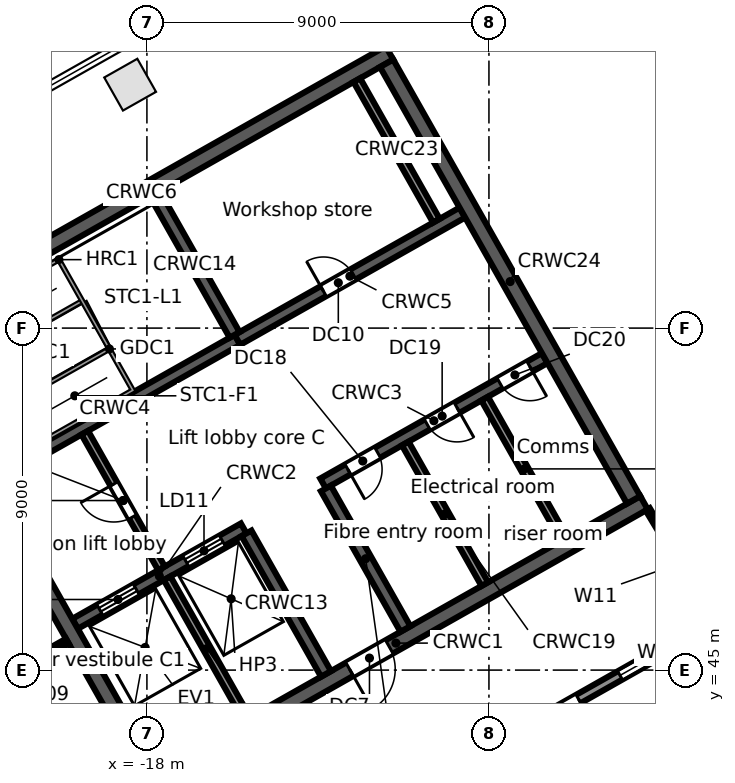
"""IFC4 building model, lengths in metres.
Left out: names, types, materials, properties, quantities, classifications, styles, units other than length and angle.
Written with IfcOpenShell. Run it as: python <this file> out.ifc"""

import sys

from ifc_helpers import new_model, si_unit, direction, frame, frame_2d, origin, origin_2d, place, context, subcontext, project, spatial, rectangle, extrude, element, fill, save


model = new_model("IFC4")
c1 = context("Model", 3, precision=1e-05, world=origin(), true_north=direction((0.0, 1.0)))
c2 = subcontext(c1, "Body", "Model", "MODEL_VIEW")
j1 = project(units=[si_unit("LENGTHUNIT", "METRE"), si_unit("PLANEANGLEUNIT", "RADIAN")], contexts=[c1])
p1 = place(None, origin())
s1 = spatial("IfcSite", under=j1, at=p1, CompositionType="ELEMENT")
p2 = place(p1, origin())
s2 = spatial("IfcBuilding", under=s1, at=p2, CompositionType="ELEMENT")
p3 = place(p2, frame((0.0, 0.0, 335.5)))
s3 = spatial("IfcBuildingStorey", under=s2, at=p3, CompositionType="ELEMENT", Elevation=335.5)
p4 = place(p3, frame((-18.441, 60.406, 0.0), z_axis=(0.0, 0.0, 1.0), x_axis=(-0.87035569594, -0.492423560103, 0.0)))
e1 = element("IfcColumn", 1, at=p4, inside=s3, PredefinedType="COLUMN", context=c2, shape_type="SweptSolid", body=[
    extrude(rectangle(XDim=1.0, YDim=1.0, at=origin_2d()), origin(), (0.0, 0.0, 1.0), 3.8),
])
p5 = place(p3, frame((-3.017, 46.293, 0.0), z_axis=(0.0, 0.0, 1.0), x_axis=(-0.870355474887, -0.492423950812, 0.0)))
e2 = element("IfcWall", 2, at=p5, inside=s3, PredefinedType="STANDARD", context=c2, shape_type="SweptSolid", body=[
    extrude(rectangle(XDim=40.34, YDim=0.25, at=frame_2d((20.17, 0.0))), origin(), (0.0, 0.0, 1.0), 3.52),
])
p6 = place(p5, frame((37.428, 0.0, 0.8)))
e3 = element("IfcOpeningElement", 3, at=p6, cuts=e2, PredefinedType="OPENING", context=c2, shape_type="SweptSolid", body=[
    extrude(rectangle(XDim=2.4, YDim=2.2, at=frame_2d((1.2, 1.1))), frame((0.0, 0.135, 0.0), z_axis=(0.0, -1.0, 0.0), x_axis=(1.0, 0.0, 0.0)), (0.0, 0.0, 1.0), 0.27),
])
p7 = place(p5, frame((34.372, 0.0, 0.0)))
e4 = element("IfcOpeningElement", 4, at=p7, cuts=e2, PredefinedType="OPENING", context=c2, shape_type="SweptSolid", body=[
    extrude(rectangle(XDim=1.8, YDim=2.4, at=frame_2d((0.9, 1.2))), frame((0.0, 0.135, 0.0), z_axis=(0.0, -1.0, 0.0), x_axis=(1.0, 0.0, 0.0)), (0.0, 0.0, 1.0), 0.27),
])
p8 = place(p5, frame((30.716, 0.0, 0.8)))
e5 = element("IfcOpeningElement", 5, at=p8, cuts=e2, PredefinedType="OPENING", context=c2, shape_type="SweptSolid", body=[
    extrude(rectangle(XDim=2.4, YDim=2.2, at=frame_2d((1.2, 1.1))), frame((0.0, 0.135, 0.0), z_axis=(0.0, -1.0, 0.0), x_axis=(1.0, 0.0, 0.0)), (0.0, 0.0, 1.0), 0.27),
])
p9 = place(p5, frame((27.36, 0.0, 0.8)))
e6 = element("IfcOpeningElement", 6, at=p9, cuts=e2, PredefinedType="OPENING", context=c2, shape_type="SweptSolid", body=[
    extrude(rectangle(XDim=2.4, YDim=2.2, at=frame_2d((1.2, 1.1))), frame((0.0, 0.135, 0.0), z_axis=(0.0, -1.0, 0.0), x_axis=(1.0, 0.0, 0.0)), (0.0, 0.0, 1.0), 0.27),
])
p10 = place(p5, frame((24.304, 0.0, 0.0)))
e7 = element("IfcOpeningElement", 7, at=p10, cuts=e2, PredefinedType="OPENING", context=c2, shape_type="SweptSolid", body=[
    extrude(rectangle(XDim=1.8, YDim=2.4, at=frame_2d((0.9, 1.2))), frame((0.0, 0.135, 0.0), z_axis=(0.0, -1.0, 0.0), x_axis=(1.0, 0.0, 0.0)), (0.0, 0.0, 1.0), 0.27),
])
p11 = place(p5, frame((20.648, 0.0, 0.8)))
e8 = element("IfcOpeningElement", 8, at=p11, cuts=e2, PredefinedType="OPENING", context=c2, shape_type="SweptSolid", body=[
    extrude(rectangle(XDim=2.4, YDim=2.2, at=frame_2d((1.2, 1.1))), frame((0.0, 0.135, 0.0), z_axis=(0.0, -1.0, 0.0), x_axis=(1.0, 0.0, 0.0)), (0.0, 0.0, 1.0), 0.27),
])
p12 = place(p5, frame((17.292, 0.0, 0.8)))
e9 = element("IfcOpeningElement", 9, at=p12, cuts=e2, PredefinedType="OPENING", context=c2, shape_type="SweptSolid", body=[
    extrude(rectangle(XDim=2.4, YDim=2.2, at=frame_2d((1.2, 1.1))), frame((0.0, 0.135, 0.0), z_axis=(0.0, -1.0, 0.0), x_axis=(1.0, 0.0, 0.0)), (0.0, 0.0, 1.0), 0.27),
])
p13 = place(p5, frame((14.236, 0.0, 0.0)))
e10 = element("IfcOpeningElement", 10, at=p13, cuts=e2, PredefinedType="OPENING", context=c2, shape_type="SweptSolid", body=[
    extrude(rectangle(XDim=1.8, YDim=2.4, at=frame_2d((0.9, 1.2))), frame((0.0, 0.135, 0.0), z_axis=(0.0, -1.0, 0.0), x_axis=(1.0, 0.0, 0.0)), (0.0, 0.0, 1.0), 0.27),
])
p14 = place(p5, frame((10.58, 0.0, 0.8)))
e11 = element("IfcOpeningElement", 11, at=p14, cuts=e2, PredefinedType="OPENING", context=c2, shape_type="SweptSolid", body=[
    extrude(rectangle(XDim=2.4, YDim=2.2, at=frame_2d((1.2, 1.1))), frame((0.0, 0.135, 0.0), z_axis=(0.0, -1.0, 0.0), x_axis=(1.0, 0.0, 0.0)), (0.0, 0.0, 1.0), 0.27),
])
p15 = place(p5, frame((7.224, 0.0, 0.8)))
e12 = element("IfcOpeningElement", 12, at=p15, cuts=e2, PredefinedType="OPENING", context=c2, shape_type="SweptSolid", body=[
    extrude(rectangle(XDim=2.4, YDim=2.2, at=frame_2d((1.2, 1.1))), frame((0.0, 0.135, 0.0), z_axis=(0.0, -1.0, 0.0), x_axis=(1.0, 0.0, 0.0)), (0.0, 0.0, 1.0), 0.27),
])
p16 = place(p5, frame((4.168, 0.0, 0.0)))
e13 = element("IfcOpeningElement", 13, at=p16, cuts=e2, PredefinedType="OPENING", context=c2, shape_type="SweptSolid", body=[
    extrude(rectangle(XDim=1.8, YDim=2.4, at=frame_2d((0.9, 1.2))), frame((0.0, 0.135, 0.0), z_axis=(0.0, -1.0, 0.0), x_axis=(1.0, 0.0, 0.0)), (0.0, 0.0, 1.0), 0.27),
])
p17 = place(p5, frame((0.512, 0.0, 0.8)))
e14 = element("IfcOpeningElement", 14, at=p17, cuts=e2, PredefinedType="OPENING", context=c2, shape_type="SweptSolid", body=[
    extrude(rectangle(XDim=2.4, YDim=2.2, at=frame_2d((1.2, 1.1))), frame((0.0, 0.135, 0.0), z_axis=(0.0, -1.0, 0.0), x_axis=(1.0, 0.0, 0.0)), (0.0, 0.0, 1.0), 0.27),
])
p18 = place(p3, frame((-17.975, 42.017, 0.0), z_axis=(0.0, 0.0, 1.0), x_axis=(0.87034965173, 0.492434243055, 0.0)))
e15 = element("IfcWall", 15, at=p18, inside=s3, PredefinedType="SOLIDWALL", context=c2, shape_type="SweptSolid", body=[
    extrude(rectangle(XDim=15.0, YDim=0.4, at=frame_2d((7.5, 0.0))), origin(), (0.0, 0.0, 1.0), 3.52),
])
p19 = place(p18, frame((6.1, 0.0, 0.0)))
e16 = element("IfcOpeningElement", 16, at=p19, cuts=e15, PredefinedType="OPENING", context=c2, shape_type="SweptSolid", body=[
    extrude(rectangle(XDim=1.2, YDim=2.1, at=frame_2d((0.6, 1.05))), frame((0.0, 0.21, 0.0), z_axis=(0.0, -1.0, 0.0), x_axis=(1.0, 0.0, 0.0)), (0.0, 0.0, 1.0), 0.42),
])
p20 = place(p3, frame((-19.892, 46.218, 0.0), z_axis=(0.0, 0.0, 1.0), x_axis=(0.870341639186, 0.492448404505, 0.0)))
e17 = element("IfcWall", 17, at=p20, inside=s3, PredefinedType="SOLIDWALL", context=c2, shape_type="SweptSolid", body=[
    extrude(rectangle(XDim=5.1, YDim=0.3, at=frame_2d((2.55, 0.0))), origin(), (0.0, 0.0, 1.0), 3.52),
])
p21 = place(p20, frame((0.75, 0.0, 0.0)))
e18 = element("IfcOpeningElement", 18, at=p21, cuts=e17, PredefinedType="OPENING", context=c2, shape_type="SweptSolid", body=[
    extrude(rectangle(XDim=1.1, YDim=2.1, at=frame_2d((0.55, 1.05))), frame((0.0, 0.16, 0.0), z_axis=(0.0, -1.0, 0.0), x_axis=(1.0, 0.0, 0.0)), (0.0, 0.0, 1.0), 0.32),
])
p22 = place(p20, frame((3.35, 0.0, 0.0)))
e19 = element("IfcOpeningElement", 19, at=p22, cuts=e17, PredefinedType="OPENING", context=c2, shape_type="SweptSolid", body=[
    extrude(rectangle(XDim=1.1, YDim=2.1, at=frame_2d((0.55, 1.05))), frame((0.0, 0.16, 0.0), z_axis=(0.0, -1.0, 0.0), x_axis=(1.0, 0.0, 0.0)), (0.0, 0.0, 1.0), 0.32),
])
p23 = place(p3, frame((-13.365, 49.911, 0.0), z_axis=(0.0, 0.0, 1.0), x_axis=(0.870347618718, 0.492437836272, 0.0)))
e20 = element("IfcWall", 20, at=p23, inside=s3, PredefinedType="SOLIDWALL", context=c2, shape_type="SweptSolid", body=[
    extrude(rectangle(XDim=6.7, YDim=0.3, at=frame_2d((3.35, 0.0))), origin(), (0.0, 0.0, 1.0), 3.52),
])
p24 = place(p23, frame((0.75, 0.0, 0.0)))
e21 = element("IfcOpeningElement", 21, at=p24, cuts=e20, PredefinedType="OPENING", context=c2, shape_type="SweptSolid", body=[
    extrude(rectangle(XDim=0.9, YDim=2.1, at=frame_2d((0.45, 1.05))), frame((0.0, 0.16, 0.0), z_axis=(0.0, -1.0, 0.0), x_axis=(1.0, 0.0, 0.0)), (0.0, 0.0, 1.0), 0.32),
])
p25 = place(p23, frame((3.15, 0.0, 0.0)))
e22 = element("IfcOpeningElement", 22, at=p25, cuts=e20, PredefinedType="OPENING", context=c2, shape_type="SweptSolid", body=[
    extrude(rectangle(XDim=0.9, YDim=2.1, at=frame_2d((0.45, 1.05))), frame((0.0, 0.16, 0.0), z_axis=(0.0, -1.0, 0.0), x_axis=(1.0, 0.0, 0.0)), (0.0, 0.0, 1.0), 0.32),
])
p26 = place(p23, frame((5.35, 0.0, 0.0)))
e23 = element("IfcOpeningElement", 23, at=p26, cuts=e20, PredefinedType="OPENING", context=c2, shape_type="SweptSolid", body=[
    extrude(rectangle(XDim=0.9, YDim=2.1, at=frame_2d((0.45, 1.05))), frame((0.0, 0.16, 0.0), z_axis=(0.0, -1.0, 0.0), x_axis=(1.0, 0.0, 0.0)), (0.0, 0.0, 1.0), 0.32),
])
p27 = place(p3, frame((-22.059, 50.047, 0.0), z_axis=(0.0, 0.0, 1.0), x_axis=(0.87035077051, 0.49243226567, 0.0)))
e24 = element("IfcWall", 24, at=p27, inside=s3, PredefinedType="SOLIDWALL", context=c2, shape_type="SweptSolid", body=[
    extrude(rectangle(XDim=7.4, YDim=0.3, at=frame_2d((3.7, 0.0))), origin(), (0.0, 0.0, 1.0), 3.52),
])
p28 = place(p27, frame((0.4, 0.0, 0.0)))
e25 = element("IfcOpeningElement", 25, at=p28, cuts=e24, PredefinedType="OPENING", context=c2, shape_type="SweptSolid", body=[
    extrude(rectangle(XDim=1.0, YDim=2.1, at=frame_2d((0.5, 1.05))), frame((0.0, 0.16, 0.0), z_axis=(0.0, -1.0, 0.0), x_axis=(1.0, 0.0, 0.0)), (0.0, 0.0, 1.0), 0.32),
])
p29 = place(p3, frame((-15.618, 53.691, 0.0), z_axis=(0.0, 0.0, 1.0), x_axis=(0.870362830851, 0.492410948978, 0.0)))
e26 = element("IfcWall", 26, at=p29, inside=s3, PredefinedType="SOLIDWALL", context=c2, shape_type="SweptSolid", body=[
    extrude(rectangle(XDim=6.8, YDim=0.3, at=frame_2d((3.4, 0.0))), origin(), (0.0, 0.0, 1.0), 3.52),
])
p30 = place(p29, frame((2.6, 0.0, 0.0)))
e27 = element("IfcOpeningElement", 27, at=p30, cuts=e26, PredefinedType="OPENING", context=c2, shape_type="SweptSolid", body=[
    extrude(rectangle(XDim=0.9, YDim=2.1, at=frame_2d((0.45, 1.05))), frame((0.0, 0.16, 0.0), z_axis=(0.0, -1.0, 0.0), x_axis=(1.0, 0.0, 0.0)), (0.0, 0.0, 1.0), 0.32),
])
p31 = place(p3, frame((-24.672, 53.854, 0.0), z_axis=(0.0, 0.0, 1.0), x_axis=(0.870353598469, 0.492427267353, 0.0)))
e28 = element("IfcWall", 28, at=p31, inside=s3, PredefinedType="SOLIDWALL", context=c2, shape_type="SweptSolid", body=[
    extrude(rectangle(XDim=15.0, YDim=0.4, at=frame_2d((7.5, 0.0))), origin(), (0.0, 0.0, 1.0), 3.52),
])
p32 = place(p3, frame((-24.4, 53.779, 0.0), z_axis=(0.0, 0.0, 1.0), x_axis=(0.492421663121, -0.870356769198, 0.0)))
e29 = element("IfcWall", 29, at=p32, inside=s3, PredefinedType="SOLIDWALL", context=c2, shape_type="SweptSolid", body=[
    extrude(rectangle(XDim=13.2, YDim=0.4, at=frame_2d((6.6, 0.0))), origin(), (0.0, 0.0, 1.0), 3.52),
])
p33 = place(p3, frame((-17.469, 47.417, 0.0), z_axis=(0.0, 0.0, 1.0), x_axis=(0.492466057713, -0.870331650579, 0.0)))
e30 = element("IfcWall", 30, at=p33, inside=s3, PredefinedType="SOLIDWALL", context=c2, shape_type="SweptSolid", body=[
    extrude(rectangle(XDim=4.25, YDim=0.2, at=frame_2d((2.125, 0.0))), origin(), (0.0, 0.0, 1.0), 3.52),
])
p34 = place(p3, frame((-19.635, 51.246, 0.0), z_axis=(0.0, 0.0, 1.0), x_axis=(0.492408451753, -0.87036424366, 0.0)))
e31 = element("IfcWall", 31, at=p34, inside=s3, PredefinedType="PARTITIONING", context=c2, shape_type="SweptSolid", body=[
    extrude(rectangle(XDim=4.1, YDim=0.2, at=frame_2d((2.05, 0.0))), origin(), (0.0, 0.0, 1.0), 3.52),
])
p35 = place(p34, frame((1.55, 0.0, 0.0)))
e32 = element("IfcOpeningElement", 32, at=p35, cuts=e31, PredefinedType="OPENING", context=c2, shape_type="SweptSolid", body=[
    extrude(rectangle(XDim=1.0, YDim=2.1, at=frame_2d((0.5, 1.05))), frame((0.0, 0.11, 0.0), z_axis=(0.0, -1.0, 0.0), x_axis=(1.0, 0.0, 0.0)), (0.0, 0.0, 1.0), 0.22),
])
for number, where, z_axis, x_axis in (
    (33, (-15.379, 48.599, 0.0), (0.0, 0.0, 1.0), (0.492, -0.87, 0.0)),
    (34, (-17.785, 57.521, 0.0), (0.0, 0.0, 1.0), (0.492, -0.87, 0.0)),
):
    element("IfcWall", number, at=place(p3, frame(where, z_axis=z_axis, x_axis=x_axis)), inside=s3, PredefinedType="SOLIDWALL", context=c2, shape_type="SweptSolid", body=[
        extrude(rectangle(XDim=4.25, YDim=0.3, at=frame_2d((2.125, 0.0))), origin(), (0.0, 0.0, 1.0), 3.52),
    ])
p36 = place(p3, frame((-13.291, 49.781, 0.0), z_axis=(0.0, 0.0, 1.0), x_axis=(0.492397924348, -0.870370199454, 0.0)))
e35 = element("IfcWall", 35, at=p36, inside=s3, PredefinedType="SOLIDWALL", context=c2, shape_type="SweptSolid", body=[
    extrude(rectangle(XDim=4.25, YDim=0.3, at=frame_2d((2.125, 0.0))), origin(), (0.0, 0.0, 1.0), 3.52),
])
p37 = place(p3, frame((-11.202, 50.962, 0.0), z_axis=(0.0, 0.0, 1.0), x_axis=(0.492441437811, -0.870345580977, 0.0)))
e36 = element("IfcWall", 36, at=p37, inside=s3, PredefinedType="PARTITIONING", context=c2, shape_type="SweptSolid", body=[
    extrude(rectangle(XDim=4.25, YDim=0.2, at=frame_2d((2.125, 0.0))), origin(), (0.0, 0.0, 1.0), 3.52),
])
p38 = place(p3, frame((-9.113, 52.144, 0.0), z_axis=(0.0, 0.0, 1.0), x_axis=(0.492422543467, -0.870356271124, 0.0)))
e37 = element("IfcWall", 37, at=p38, inside=s3, PredefinedType="PARTITIONING", context=c2, shape_type="SweptSolid", body=[
    extrude(rectangle(XDim=4.25, YDim=0.2, at=frame_2d((2.125, 0.0))), origin(), (0.0, 0.0, 1.0), 3.52),
])
p39 = place(p3, frame((-12.476, 60.525, 0.0), z_axis=(0.0, 0.0, 1.0), x_axis=(0.492422543467, -0.870356271124, 0.0)))
e38 = element("IfcWall", 38, at=p39, inside=s3, PredefinedType="SOLIDWALL", context=c2, shape_type="SweptSolid", body=[
    extrude(rectangle(XDim=4.25, YDim=0.2, at=frame_2d((2.125, 0.0))), origin(), (0.0, 0.0, 1.0), 3.52),
])
p40 = place(p3, frame((-11.692, 60.968, 0.0), z_axis=(0.0, 0.0, 1.0), x_axis=(0.492421663121, -0.870356769198, 0.0)))
e39 = element("IfcWall", 39, at=p40, inside=s3, PredefinedType="SOLIDWALL", context=c2, shape_type="SweptSolid", body=[
    extrude(rectangle(XDim=13.2, YDim=0.4, at=frame_2d((6.6, 0.0))), origin(), (0.0, 0.0, 1.0), 3.52),
])
p41 = place(p3, frame((-22.565, 44.361, 0.0), z_axis=(0.0, 0.0, 1.0), x_axis=(0.492371842706, -0.870384954207, 0.0)))
e40 = element("IfcWall", 40, at=p41, inside=s3, PredefinedType="PARTITIONING", context=c2, shape_type="SweptSolid", body=[
    extrude(rectangle(XDim=4.5, YDim=0.125, at=frame_2d((2.25, 0.0))), origin(), (0.0, 0.0, 1.0), 3.52),
])
p42 = place(p3, frame((-22.565, 44.361, 0.0), z_axis=(0.0, 0.0, 1.0), x_axis=(0.87029856663, 0.492524522152, 0.0)))
e41 = element("IfcWall", 41, at=p42, inside=s3, PredefinedType="PARTITIONING", context=c2, shape_type="SweptSolid", body=[
    extrude(rectangle(XDim=2.84, YDim=0.15, at=frame_2d((1.42, 0.0))), origin(), (0.0, 0.0, 1.0), 3.52),
])
p43 = place(p3, frame((-4.821, 49.23, 0.0), z_axis=(0.0, 0.0, 1.0), x_axis=(0.515006587647, -0.857186219371, 0.0)))
e42 = element("IfcWall", 42, at=p43, inside=s3, PredefinedType="PARTITIONING", context=c2, shape_type="SweptSolid", body=[
    extrude(rectangle(XDim=3.303, YDim=0.125, at=frame_2d((1.651, 0.0))), origin(), (0.0, 0.0, 1.0), 2.8),
])
p44 = place(p43, frame((1.2, 0.0, 0.0)))
e43 = element("IfcOpeningElement", 43, at=p44, cuts=e42, PredefinedType="OPENING", context=c2, shape_type="SweptSolid", body=[
    extrude(rectangle(XDim=1.8, YDim=2.1, at=frame_2d((0.9, 1.05))), frame((0.0, 0.073, 0.0), z_axis=(0.0, -1.0, 0.0), x_axis=(1.0, 0.0, 0.0)), (0.0, 0.0, 1.0), 0.145),
])
p45 = place(p16, origin())
e44 = element("IfcDoor", 44, at=p45, inside=s3, OperationType="DOUBLE_DOOR_SINGLE_SWING", PredefinedType="DOOR", context=c2, shape_type="SweptSolid", body=[
    extrude(rectangle(XDim=1.8, YDim=2.4, at=frame_2d((0.9, 1.2))), frame((0.0, 0.025, 0.0), z_axis=(0.0, -1.0, 0.0), x_axis=(1.0, 0.0, 0.0)), (0.0, 0.0, 1.0), 0.05),
])
fill(e13, e44)
p46 = place(p17, origin())
e45 = element("IfcWindow", 45, at=p46, inside=s3, PartitioningType="SINGLE_PANEL", PredefinedType="WINDOW", context=c2, shape_type="SweptSolid", body=[
    extrude(rectangle(XDim=2.4, YDim=2.2, at=frame_2d((1.2, 1.1))), frame((0.0, 0.03, 0.0), z_axis=(0.0, -1.0, 0.0), x_axis=(1.0, 0.0, 0.0)), (0.0, 0.0, 1.0), 0.06),
])
fill(e14, e45)
p47 = place(p21, origin())
e46 = element("IfcDoor", 46, at=p47, inside=s3, OperationType="DOUBLE_DOOR_SLIDING", PredefinedType="DOOR", context=c2, shape_type="SweptSolid", body=[
    extrude(rectangle(XDim=1.1, YDim=2.1, at=frame_2d((0.55, 1.05))), frame((0.0, 0.025, 0.0), z_axis=(0.0, -1.0, 0.0), x_axis=(1.0, 0.0, 0.0)), (0.0, 0.0, 1.0), 0.05),
])
fill(e18, e46)
p48 = place(p22, origin())
e47 = element("IfcDoor", 47, at=p48, inside=s3, OperationType="DOUBLE_DOOR_SLIDING", PredefinedType="DOOR", context=c2, shape_type="SweptSolid", body=[
    extrude(rectangle(XDim=1.1, YDim=2.1, at=frame_2d((0.55, 1.05))), frame((0.0, 0.025, 0.0), z_axis=(0.0, -1.0, 0.0), x_axis=(1.0, 0.0, 0.0)), (0.0, 0.0, 1.0), 0.05),
])
fill(e19, e47)
p49 = place(p35, frame((1.0, 0.0, 0.0), z_axis=(0.0, 0.0, 1.0), x_axis=(-1.0, 0.0, 0.0)))
e48 = element("IfcDoor", 48, at=p49, inside=s3, OperationType="SINGLE_SWING_RIGHT", PredefinedType="DOOR", context=c2, shape_type="SweptSolid", body=[
    extrude(rectangle(XDim=1.0, YDim=2.1, at=frame_2d((0.5, 1.05))), frame((0.0, 0.025, 0.0), z_axis=(0.0, -1.0, 0.0), x_axis=(1.0, 0.0, 0.0)), (0.0, 0.0, 1.0), 0.05),
])
fill(e32, e48)
p50 = place(p19, frame((1.2, 0.0, 0.0), z_axis=(0.0, 0.0, 1.0), x_axis=(-1.0, 0.0, 0.0)))
e49 = element("IfcDoor", 49, at=p50, inside=s3, OperationType="SINGLE_SWING_RIGHT", PredefinedType="DOOR", context=c2, shape_type="SweptSolid", body=[
    extrude(rectangle(XDim=1.2, YDim=2.1, at=frame_2d((0.6, 1.05))), frame((0.0, 0.025, 0.0), z_axis=(0.0, -1.0, 0.0), x_axis=(1.0, 0.0, 0.0)), (0.0, 0.0, 1.0), 0.05),
])
fill(e16, e49)
p51 = place(p30, origin())
e50 = element("IfcDoor", 50, at=p51, inside=s3, OperationType="SINGLE_SWING_LEFT", PredefinedType="DOOR", context=c2, shape_type="SweptSolid", body=[
    extrude(rectangle(XDim=0.9, YDim=2.1, at=frame_2d((0.45, 1.05))), frame((0.0, 0.025, 0.0), z_axis=(0.0, -1.0, 0.0), x_axis=(1.0, 0.0, 0.0)), (0.0, 0.0, 1.0), 0.05),
])
fill(e27, e50)
p52 = place(p24, frame((0.9, 0.0, 0.0), z_axis=(0.0, 0.0, 1.0), x_axis=(-1.0, 0.0, 0.0)))
e51 = element("IfcDoor", 51, at=p52, inside=s3, OperationType="SINGLE_SWING_RIGHT", PredefinedType="DOOR", context=c2, shape_type="SweptSolid", body=[
    extrude(rectangle(XDim=0.9, YDim=2.1, at=frame_2d((0.45, 1.05))), frame((0.0, 0.025, 0.0), z_axis=(0.0, -1.0, 0.0), x_axis=(1.0, 0.0, 0.0)), (0.0, 0.0, 1.0), 0.05),
])
fill(e21, e51)
p53 = place(p25, frame((0.9, 0.0, 0.0), z_axis=(0.0, 0.0, 1.0), x_axis=(-1.0, 0.0, 0.0)))
e52 = element("IfcDoor", 52, at=p53, inside=s3, OperationType="SINGLE_SWING_LEFT", PredefinedType="DOOR", context=c2, shape_type="SweptSolid", body=[
    extrude(rectangle(XDim=0.9, YDim=2.1, at=frame_2d((0.45, 1.05))), frame((0.0, 0.025, 0.0), z_axis=(0.0, -1.0, 0.0), x_axis=(1.0, 0.0, 0.0)), (0.0, 0.0, 1.0), 0.05),
])
fill(e22, e52)
p54 = place(p26, frame((0.9, 0.0, 0.0), z_axis=(0.0, 0.0, 1.0), x_axis=(-1.0, 0.0, 0.0)))
e53 = element("IfcDoor", 53, at=p54, inside=s3, OperationType="SINGLE_SWING_LEFT", PredefinedType="DOOR", context=c2, shape_type="SweptSolid", body=[
    extrude(rectangle(XDim=0.9, YDim=2.1, at=frame_2d((0.45, 1.05))), frame((0.0, 0.025, 0.0), z_axis=(0.0, -1.0, 0.0), x_axis=(1.0, 0.0, 0.0)), (0.0, 0.0, 1.0), 0.05),
])
fill(e23, e53)
save(model, sys.argv[1])
